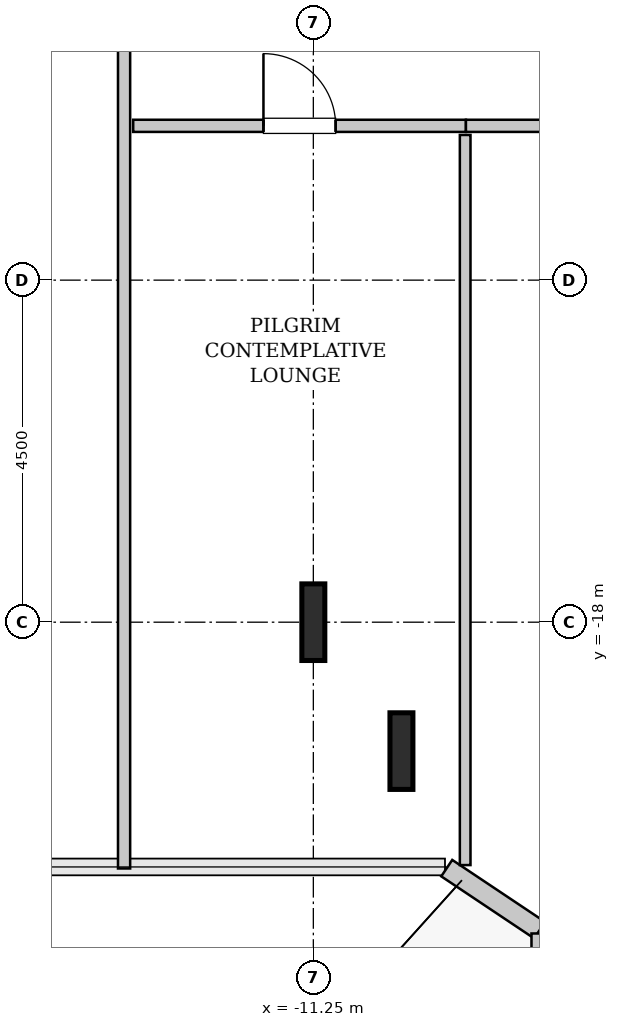
"""IFC4 building model, lengths in metres.
Left out: names, types, materials, properties, quantities, classifications, styles, units other than length and angle.
Written with IfcOpenShell. Run it as: python <this file> out.ifc"""

import sys

from ifc_helpers import new_model, si_unit, direction, frame, frame_2d, origin, origin_2d, place, context, subcontext, project, spatial, rectangle, i_section, extrude, source, transform, mapped, element, fill, save


model = new_model("IFC4")
c1 = context("Model", 3, precision=1e-05, world=origin(), true_north=direction((0.0, 1.0)))
c2 = subcontext(c1, "Body", "Model", "MODEL_VIEW")
j1 = project(units=[si_unit("LENGTHUNIT", "METRE"), si_unit("PLANEANGLEUNIT", "RADIAN")], contexts=[c1])
p1 = place(None, origin())
s1 = spatial("IfcSite", under=j1, at=p1, CompositionType="ELEMENT")
p2 = place(p1, origin())
s2 = spatial("IfcBuilding", under=s1, at=p2, CompositionType="ELEMENT")
p3 = place(p2, frame((0.0, 0.0, 102.2)))
s3 = spatial("IfcBuildingStorey", under=s2, at=p3, CompositionType="ELEMENT", Elevation=102.2)
m1 = source(origin(), c2, "Body", "SweptSolid", [
    extrude(i_section(OverallWidth=0.302, OverallDepth=1.008, WebThickness=0.021, FlangeThickness=0.04, FilletRadius=0.03, at=origin_2d()), origin(), (0.0, 0.0, 1.0), 3.8),
])
for number, where, z_axis, x_axis in (
    (1, (-11.25, -18.0, 0.0), (0.0, 0.0, 1.0), (1.0, 0.0, 0.0)),
    (2, (-10.091, -19.696, 0.0), (0.0, 0.0, 1.0), (1.0, 0.0, 0.0)),
):
    element("IfcColumn", number, at=place(p3, frame(where, z_axis=z_axis, x_axis=x_axis)), inside=s3, PredefinedType="COLUMN", context=c2, shape_type="MappedRepresentation", body=[
        mapped(m1, transform((0.0, 0.0, 0.0), x_axis=(1.0, 0.0, 0.0), y_axis=(0.0, 1.0, 0.0), z_axis=(0.0, 0.0, 1.0), scale=1.0)),
    ])
m2 = source(origin(), c2, "Body", "SweptSolid", [
    extrude(rectangle(XDim=1.469, YDim=0.26, at=frame_2d((0.734, 0.0))), origin(), (0.0, 0.0, 1.0), 3.55),
])
p4 = place(p3, frame((-9.495, -21.236, 0.0), z_axis=(0.0, 0.0, 1.0), x_axis=(0.831461760506, -0.555581983884, 0.0)))
e3 = element("IfcWall", 3, at=p4, inside=s3, PredefinedType="SOLIDWALL", context=c2, shape_type="MappedRepresentation", body=[
    mapped(m2, transform((0.0, 0.0, 0.0), x_axis=(1.0, 0.0, 0.0), y_axis=(0.0, 1.0, 0.0), z_axis=(0.0, 0.0, 1.0), scale=1.0)),
])
m3 = source(origin(), c2, "Body", "SweptSolid", [
    extrude(rectangle(XDim=0.897, YDim=0.26, at=frame_2d((0.448, 0.0))), origin(), (0.0, 0.0, 1.0), 3.55),
])
p5 = place(p3, frame((-8.25, -22.095, 0.0), z_axis=(0.0, 0.0, 1.0), x_axis=(0.0, -1.0, 0.0)))
e4 = element("IfcWall", 4, at=p5, inside=s3, PredefinedType="SOLIDWALL", context=c2, shape_type="MappedRepresentation", body=[
    mapped(m3, transform((0.0, 0.0, 0.0), x_axis=(1.0, 0.0, 0.0), y_axis=(0.0, 1.0, 0.0), z_axis=(0.0, 0.0, 1.0), scale=1.0)),
])
m4 = source(origin(), c2, "Body", "SweptSolid", [
    extrude(rectangle(XDim=18.445, YDim=0.16, at=frame_2d((9.223, 0.0))), origin(), (0.0, 0.0, 1.0), 3.535),
])
p6 = place(p3, frame((-13.74, -21.24, 0.0), z_axis=(0.0, 0.0, 1.0), x_axis=(0.0, 1.0, 0.0)))
e5 = element("IfcWall", 5, at=p6, inside=s3, PredefinedType="PARTITIONING", context=c2, shape_type="MappedRepresentation", body=[
    mapped(m4, transform((0.0, 0.0, 0.0), x_axis=(1.0, 0.0, 0.0), y_axis=(0.0, 1.0, 0.0), z_axis=(0.0, 0.0, 1.0), scale=1.0)),
])
p7 = place(p6, frame((13.613, 0.0, 0.0)))
e6 = element("IfcOpeningElement", 6, at=p7, cuts=e5, PredefinedType="OPENING", context=c2, shape_type="SweptSolid", body=[
    extrude(rectangle(XDim=0.95, YDim=2.1, at=frame_2d((0.475, 1.05))), frame((0.0, 0.09, 0.0), z_axis=(0.0, -1.0, 0.0), x_axis=(1.0, 0.0, 0.0)), (0.0, 0.0, 1.0), 0.18),
])
m5 = source(origin(), c2, "Body", "SweptSolid", [
    extrude(rectangle(XDim=4.378, YDim=0.16, at=frame_2d((2.189, 0.0))), origin(), (0.0, 0.0, 1.0), 3.535),
])
p8 = place(p3, frame((-13.62, -11.47, 0.0), z_axis=(0.0, 0.0, 1.0), x_axis=(1.0, 0.0, 0.0)))
e7 = element("IfcWall", 7, at=p8, inside=s3, PredefinedType="PARTITIONING", context=c2, shape_type="MappedRepresentation", body=[
    mapped(m5, transform((0.0, 0.0, 0.0), x_axis=(1.0, 0.0, 0.0), y_axis=(0.0, 1.0, 0.0), z_axis=(0.0, 0.0, 1.0), scale=1.0)),
])
p9 = place(p8, frame((1.714, 0.0, 0.0)))
e8 = element("IfcOpeningElement", 8, at=p9, cuts=e7, PredefinedType="OPENING", context=c2, shape_type="SweptSolid", body=[
    extrude(rectangle(XDim=0.95, YDim=2.1, at=frame_2d((0.475, 1.05))), frame((0.0, 0.09, 0.0), z_axis=(0.0, -1.0, 0.0), x_axis=(1.0, 0.0, 0.0)), (0.0, 0.0, 1.0), 0.18),
])
m6 = source(origin(), c2, "Body", "SweptSolid", [
    extrude(rectangle(XDim=9.605, YDim=0.14, at=frame_2d((4.803, 0.0))), origin(), (0.0, 0.0, 1.0), 3.535),
])
p10 = place(p3, frame((-9.252, -21.195, 0.0), z_axis=(0.0, 0.0, 1.0), x_axis=(0.0, 1.0, 0.0)))
e9 = element("IfcWall", 9, at=p10, inside=s3, PredefinedType="PARTITIONING", context=c2, shape_type="MappedRepresentation", body=[
    mapped(m6, transform((0.0, 0.0, 0.0), x_axis=(1.0, 0.0, 0.0), y_axis=(0.0, 1.0, 0.0), z_axis=(0.0, 0.0, 1.0), scale=1.0)),
])
m7 = source(origin(), c2, "Body", "SweptSolid", [
    extrude(rectangle(XDim=4.482, YDim=0.16, at=frame_2d((2.241, 0.0))), origin(), (0.0, 0.0, 1.0), 3.535),
])
p11 = place(p3, frame((-9.242, -11.47, 0.0), z_axis=(0.0, 0.0, 1.0), x_axis=(1.0, 0.0, 0.0)))
e10 = element("IfcWall", 10, at=p11, inside=s3, PredefinedType="PARTITIONING", context=c2, shape_type="MappedRepresentation", body=[
    mapped(m7, transform((0.0, 0.0, 0.0), x_axis=(1.0, 0.0, 0.0), y_axis=(0.0, 1.0, 0.0), z_axis=(0.0, 0.0, 1.0), scale=1.0)),
])
p12 = place(p11, frame((1.766, 0.0, 0.0)))
e11 = element("IfcOpeningElement", 11, at=p12, cuts=e10, PredefinedType="OPENING", context=c2, shape_type="SweptSolid", body=[
    extrude(rectangle(XDim=0.95, YDim=2.1, at=frame_2d((0.475, 1.05))), frame((0.0, 0.09, 0.0), z_axis=(0.0, -1.0, 0.0), x_axis=(1.0, 0.0, 0.0)), (0.0, 0.0, 1.0), 0.18),
])
m8 = source(origin(), c2, "Body", "SweptSolid", [
    extrude(rectangle(XDim=0.95, YDim=2.1, at=frame_2d((0.475, 1.05))), frame((0.0, 0.025, 0.0), z_axis=(0.0, -1.0, 0.0), x_axis=(1.0, 0.0, 0.0)), (0.0, 0.0, 1.0), 0.05),
])
p13 = place(p9, origin())
e12 = element("IfcDoor", 12, at=p13, inside=s3, OperationType="SINGLE_SWING_LEFT", PredefinedType="DOOR", context=c2, shape_type="MappedRepresentation", body=[
    mapped(m8, transform((0.0, 0.0, 0.0), x_axis=(1.0, 0.0, 0.0), y_axis=(0.0, 1.0, 0.0), z_axis=(0.0, 0.0, 1.0), scale=1.0)),
])
fill(e8, e12)
save(model, sys.argv[1])
